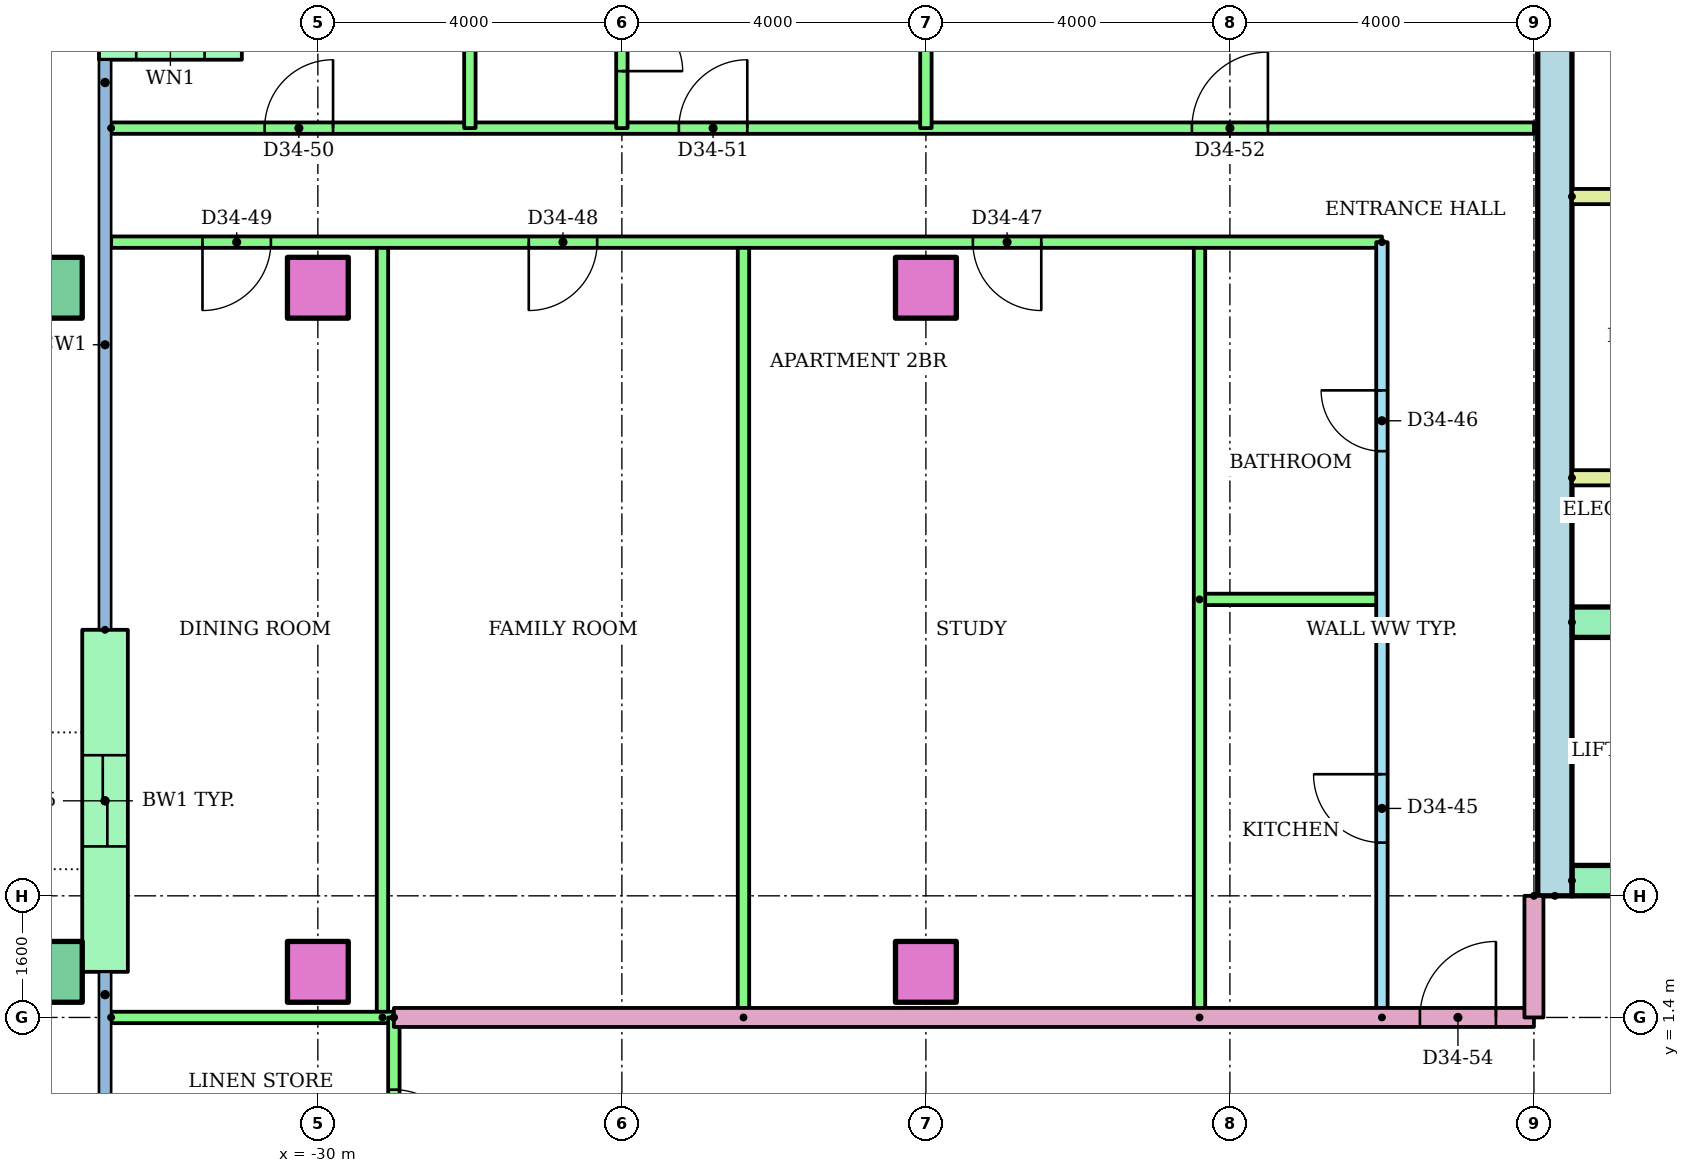
"""IFC4 building model, lengths in metres.
Left out: names, types, materials, properties, quantities, classifications, styles, units other than length and angle.
Written with IfcOpenShell. Run it as: python <this file> out.ifc"""

import sys

from ifc_helpers import new_model, si_unit, direction, frame, frame_2d, origin, origin_2d, place, context, subcontext, project, spatial, rectangle, hollow_rectangle, extrude, element, fill, save


model = new_model("IFC4")
c1 = context("Model", 3, precision=1e-05, world=origin(), true_north=direction((0.0, 1.0)))
c2 = subcontext(c1, "Body", "Model", "MODEL_VIEW")
j1 = project(units=[si_unit("LENGTHUNIT", "METRE"), si_unit("PLANEANGLEUNIT", "RADIAN")], contexts=[c1])
p1 = place(None, origin())
s1 = spatial("IfcSite", under=j1, at=p1, CompositionType="ELEMENT")
p2 = place(p1, origin())
s2 = spatial("IfcBuilding", under=s1, at=p2, CompositionType="ELEMENT")
p3 = place(p2, frame((0.0, 0.0, 132.6)))
s3 = spatial("IfcBuildingStorey", under=s2, at=p3, CompositionType="ELEMENT", Elevation=132.6)
p4 = place(p3, frame((-33.5, 2.0, 0.0)))
e1 = element("IfcColumn", 1, at=p4, inside=s3, PredefinedType="COLUMN", context=c2, shape_type="SweptSolid", body=[
    extrude(hollow_rectangle(XDim=0.8, YDim=0.8, WallThickness=0.04, at=origin_2d()), origin(), (0.0, 0.0, 1.0), 3.2),
])
for number, where in (
    (2, (-30.0, 2.0, 0.0)),
    (3, (-22.0, 2.0, 0.0)),
):
    element("IfcColumn", number, at=place(p3, frame(where)), inside=s3, PredefinedType="COLUMN", context=c2, shape_type="SweptSolid", body=[
        extrude(rectangle(XDim=0.8, YDim=0.8, at=origin_2d()), origin(), (0.0, 0.0, 1.0), 3.2),
    ])
p5 = place(p3, frame((-33.5, 11.0, 0.0)))
e4 = element("IfcColumn", 4, at=p5, inside=s3, PredefinedType="COLUMN", context=c2, shape_type="SweptSolid", body=[
    extrude(hollow_rectangle(XDim=0.8, YDim=0.8, WallThickness=0.04, at=origin_2d()), origin(), (0.0, 0.0, 1.0), 3.2),
])
for number, where in (
    (5, (-30.0, 11.0, 0.0)),
    (6, (-22.0, 11.0, 0.0)),
):
    element("IfcColumn", number, at=place(p3, frame(where)), inside=s3, PredefinedType="COLUMN", context=c2, shape_type="SweptSolid", body=[
        extrude(rectangle(XDim=0.8, YDim=0.8, at=origin_2d()), origin(), (0.0, 0.0, 1.0), 3.2),
    ])
p6 = place(p3, frame((-31.0, 14.3, 0.0), z_axis=(0.0, 0.0, 1.0), x_axis=(-1.0, 0.0, 0.0)))
e7 = element("IfcWall", 7, at=p6, inside=s3, PredefinedType="STANDARD", context=c2, shape_type="SweptSolid", body=[
    extrude(rectangle(XDim=1.88, YDim=0.6, at=frame_2d((0.94, 0.0))), origin(), (0.0, 0.0, 1.0), 2.92),
])
p7 = place(p6, frame((0.49, 0.0, 0.9)))
e8 = element("IfcOpeningElement", 8, at=p7, cuts=e7, PredefinedType="OPENING", context=c2, shape_type="SweptSolid", body=[
    extrude(rectangle(XDim=0.9, YDim=1.5, at=frame_2d((0.45, 0.75))), frame((0.0, 0.31, 0.0), z_axis=(0.0, -1.0, 0.0), x_axis=(1.0, 0.0, 0.0)), (0.0, 0.0, 1.0), 0.62),
])
p8 = place(p3, frame((-32.8, 6.5, 0.0), z_axis=(0.0, 0.0, 1.0), x_axis=(0.0, -1.0, 0.0)))
e9 = element("IfcWall", 9, at=p8, inside=s3, PredefinedType="STANDARD", context=c2, shape_type="SweptSolid", body=[
    extrude(rectangle(XDim=4.5, YDim=0.6, at=frame_2d((2.25, 0.0))), origin(), (0.0, 0.0, 1.0), 2.92),
])
p9 = place(p8, frame((1.65, 0.0, 0.0)))
e10 = element("IfcOpeningElement", 10, at=p9, cuts=e9, PredefinedType="OPENING", context=c2, shape_type="SweptSolid", body=[
    extrude(rectangle(XDim=1.2, YDim=2.1, at=frame_2d((0.6, 1.05))), frame((0.0, 0.31, 0.0), z_axis=(0.0, -1.0, 0.0), x_axis=(1.0, 0.0, 0.0)), (0.0, 0.0, 1.0), 0.62),
])
p10 = place(p3, frame((-13.725, 3.0, 0.0), z_axis=(0.0, 0.0, 1.0), x_axis=(0.0, 1.0, 0.0)))
e11 = element("IfcWall", 11, at=p10, inside=s3, PredefinedType="SHEAR", context=c2, shape_type="SweptSolid", body=[
    extrude(rectangle(XDim=17.0, YDim=0.45, at=frame_2d((8.5, 0.0))), origin(), (0.0, 0.0, 1.0), 2.92),
])
p11 = place(p3, frame((-13.5, 3.2, 0.0)))
e12 = element("IfcWall", 12, at=p11, inside=s3, PredefinedType="SHEAR", context=c2, shape_type="SweptSolid", body=[
    extrude(rectangle(XDim=27.0, YDim=0.4, at=frame_2d((13.5, 0.0))), origin(), (0.0, 0.0, 1.0), 2.92),
])
p12 = place(p11, frame((6.861, 0.0, 0.0)))
e13 = element("IfcOpeningElement", 13, at=p12, cuts=e12, PredefinedType="OPENING", context=c2, shape_type="SweptSolid", body=[
    extrude(rectangle(XDim=1.1, YDim=2.1, at=frame_2d((0.55, 1.05))), frame((0.0, 0.21, 0.0), z_axis=(0.0, -1.0, 0.0), x_axis=(1.0, 0.0, 0.0)), (0.0, 0.0, 1.0), 0.42),
])
p13 = place(p11, frame((9.906, 0.0, 0.0)))
e14 = element("IfcOpeningElement", 14, at=p13, cuts=e12, PredefinedType="OPENING", context=c2, shape_type="SweptSolid", body=[
    extrude(rectangle(XDim=1.1, YDim=2.1, at=frame_2d((0.55, 1.05))), frame((0.0, 0.21, 0.0), z_axis=(0.0, -1.0, 0.0), x_axis=(1.0, 0.0, 0.0)), (0.0, 0.0, 1.0), 0.42),
])
p14 = place(p11, frame((15.994, 0.0, 0.0)))
e15 = element("IfcOpeningElement", 15, at=p14, cuts=e12, PredefinedType="OPENING", context=c2, shape_type="SweptSolid", body=[
    extrude(rectangle(XDim=1.1, YDim=2.1, at=frame_2d((0.55, 1.05))), frame((0.0, 0.21, 0.0), z_axis=(0.0, -1.0, 0.0), x_axis=(1.0, 0.0, 0.0)), (0.0, 0.0, 1.0), 0.42),
])
p15 = place(p11, frame((19.039, 0.0, 0.0)))
e16 = element("IfcOpeningElement", 16, at=p15, cuts=e12, PredefinedType="OPENING", context=c2, shape_type="SweptSolid", body=[
    extrude(rectangle(XDim=1.1, YDim=2.1, at=frame_2d((0.55, 1.05))), frame((0.0, 0.21, 0.0), z_axis=(0.0, -1.0, 0.0), x_axis=(1.0, 0.0, 0.0)), (0.0, 0.0, 1.0), 0.42),
])
p16 = place(p11, frame((12.6, 0.0, 0.0)))
e17 = element("IfcOpeningElement", 17, at=p16, cuts=e12, PredefinedType="OPENING", context=c2, shape_type="SweptSolid", body=[
    extrude(rectangle(XDim=1.8, YDim=2.1, at=frame_2d((0.9, 1.05))), frame((0.0, 0.21, 0.0), z_axis=(0.0, -1.0, 0.0), x_axis=(1.0, 0.0, 0.0)), (0.0, 0.0, 1.0), 0.42),
])
p17 = place(p3, frame((-13.5, 6.6, 0.0)))
e18 = element("IfcWall", 18, at=p17, inside=s3, PredefinedType="SHEAR", context=c2, shape_type="SweptSolid", body=[
    extrude(rectangle(XDim=11.978, YDim=0.4, at=frame_2d((5.989, 0.0))), origin(), (0.0, 0.0, 1.0), 2.92),
])
for number, where in (
    (19, (-13.5, 8.5, 0.0)),
    (20, (-13.5, 12.2, 0.0)),
):
    element("IfcWall", number, at=place(p3, frame(where)), inside=s3, PredefinedType="PARTITIONING", context=c2, shape_type="SweptSolid", body=[
        extrude(rectangle(XDim=3.9, YDim=0.2, at=frame_2d((1.95, 0.0))), origin(), (0.0, 0.0, 1.0), 2.92),
    ])
p18 = place(p3, frame((-16.0, 1.4, 0.0), z_axis=(0.0, 0.0, 1.0), x_axis=(0.0, 1.0, 0.0)))
e21 = element("IfcWall", 21, at=p18, inside=s3, PredefinedType="PARTITIONING", context=c2, shape_type="SweptSolid", body=[
    extrude(rectangle(XDim=10.2, YDim=0.15, at=frame_2d((5.1, 0.0))), origin(), (0.0, 0.0, 1.0), 2.4),
])
p19 = place(p18, frame((2.3, 0.0, 0.0)))
e22 = element("IfcOpeningElement", 22, at=p19, cuts=e21, PredefinedType="OPENING", context=c2, shape_type="SweptSolid", body=[
    extrude(rectangle(XDim=0.9, YDim=2.1, at=frame_2d((0.45, 1.05))), frame((0.0, 0.085, 0.0), z_axis=(0.0, -1.0, 0.0), x_axis=(1.0, 0.0, 0.0)), (0.0, 0.0, 1.0), 0.17),
])
p20 = place(p18, frame((7.45, 0.0, 0.0)))
e23 = element("IfcOpeningElement", 23, at=p20, cuts=e21, PredefinedType="OPENING", context=c2, shape_type="SweptSolid", body=[
    extrude(rectangle(XDim=0.8, YDim=2.1, at=frame_2d((0.4, 1.05))), frame((0.0, 0.085, 0.0), z_axis=(0.0, -1.0, 0.0), x_axis=(1.0, 0.0, 0.0)), (0.0, 0.0, 1.0), 0.17),
])
p21 = place(p3, frame((-18.4, 6.9, 0.0)))
e24 = element("IfcWall", 24, at=p21, inside=s3, PredefinedType="PARTITIONING", context=c2, shape_type="SweptSolid", body=[
    extrude(rectangle(XDim=2.4, YDim=0.15, at=frame_2d((1.2, 0.0))), origin(), (0.0, 0.0, 1.0), 2.4),
])
for number, where, z_axis, x_axis in (
    (25, (-18.4, 1.4, 0.0), (0.0, 0.0, 1.0), (0.0, 1.0, 0.0)),
    (26, (-24.4, 1.4, 0.0), (0.0, 0.0, 1.0), (0.0, 1.0, 0.0)),
    (27, (-29.15, 1.4, 0.0), (0.0, 0.0, 1.0), (0.0, 1.0, 0.0)),
):
    element("IfcWall", number, at=place(p3, frame(where, z_axis=z_axis, x_axis=x_axis)), inside=s3, PredefinedType="PARTITIONING", context=c2, shape_type="SweptSolid", body=[
        extrude(rectangle(XDim=10.2, YDim=0.15, at=frame_2d((5.1, 0.0))), origin(), (0.0, 0.0, 1.0), 2.4),
    ])
p22 = place(p3, frame((-16.0, 11.6, 0.0), z_axis=(0.0, 0.0, 1.0), x_axis=(-1.0, 0.0, 0.0)))
e28 = element("IfcWall", 28, at=p22, inside=s3, PredefinedType="PARTITIONING", context=c2, shape_type="SweptSolid", body=[
    extrude(rectangle(XDim=16.72, YDim=0.15, at=frame_2d((8.36, 0.0))), origin(), (0.0, 0.0, 1.0), 2.4),
])
p23 = place(p22, frame((4.482, 0.0, 0.0)))
e29 = element("IfcOpeningElement", 29, at=p23, cuts=e28, PredefinedType="OPENING", context=c2, shape_type="SweptSolid", body=[
    extrude(rectangle(XDim=0.9, YDim=2.1, at=frame_2d((0.45, 1.05))), frame((0.0, 0.085, 0.0), z_axis=(0.0, -1.0, 0.0), x_axis=(1.0, 0.0, 0.0)), (0.0, 0.0, 1.0), 0.17),
])
p24 = place(p22, frame((10.325, 0.0, 0.0)))
e30 = element("IfcOpeningElement", 30, at=p24, cuts=e28, PredefinedType="OPENING", context=c2, shape_type="SweptSolid", body=[
    extrude(rectangle(XDim=0.9, YDim=2.1, at=frame_2d((0.45, 1.05))), frame((0.0, 0.085, 0.0), z_axis=(0.0, -1.0, 0.0), x_axis=(1.0, 0.0, 0.0)), (0.0, 0.0, 1.0), 0.17),
])
p25 = place(p22, frame((14.618, 0.0, 0.0)))
e31 = element("IfcOpeningElement", 31, at=p25, cuts=e28, PredefinedType="OPENING", context=c2, shape_type="SweptSolid", body=[
    extrude(rectangle(XDim=0.9, YDim=2.1, at=frame_2d((0.45, 1.05))), frame((0.0, 0.085, 0.0), z_axis=(0.0, -1.0, 0.0), x_axis=(1.0, 0.0, 0.0)), (0.0, 0.0, 1.0), 0.17),
])
p26 = place(p3, frame((-32.72, 13.1, 0.0)))
e32 = element("IfcWall", 32, at=p26, inside=s3, PredefinedType="PARTITIONING", context=c2, shape_type="SweptSolid", body=[
    extrude(rectangle(XDim=18.72, YDim=0.15, at=frame_2d((9.36, 0.0))), origin(), (0.0, 0.0, 1.0), 2.4),
])
p27 = place(p26, frame((2.02, 0.0, 0.0)))
e33 = element("IfcOpeningElement", 33, at=p27, cuts=e32, PredefinedType="OPENING", context=c2, shape_type="SweptSolid", body=[
    extrude(rectangle(XDim=0.9, YDim=2.1, at=frame_2d((0.45, 1.05))), frame((0.0, 0.085, 0.0), z_axis=(0.0, -1.0, 0.0), x_axis=(1.0, 0.0, 0.0)), (0.0, 0.0, 1.0), 0.17),
])
p28 = place(p26, frame((7.47, 0.0, 0.0)))
e34 = element("IfcOpeningElement", 34, at=p28, cuts=e32, PredefinedType="OPENING", context=c2, shape_type="SweptSolid", body=[
    extrude(rectangle(XDim=0.9, YDim=2.1, at=frame_2d((0.45, 1.05))), frame((0.0, 0.085, 0.0), z_axis=(0.0, -1.0, 0.0), x_axis=(1.0, 0.0, 0.0)), (0.0, 0.0, 1.0), 0.17),
])
p29 = place(p26, frame((14.22, 0.0, 0.0)))
e35 = element("IfcOpeningElement", 35, at=p29, cuts=e32, PredefinedType="OPENING", context=c2, shape_type="SweptSolid", body=[
    extrude(rectangle(XDim=1.0, YDim=2.1, at=frame_2d((0.5, 1.05))), frame((0.0, 0.085, 0.0), z_axis=(0.0, -1.0, 0.0), x_axis=(1.0, 0.0, 0.0)), (0.0, 0.0, 1.0), 0.17),
])
p30 = place(p3, frame((-28.0, 16.92, 0.0), z_axis=(0.0, 0.0, 1.0), x_axis=(0.0, -1.0, 0.0)))
e36 = element("IfcWall", 36, at=p30, inside=s3, PredefinedType="PARTITIONING", context=c2, shape_type="SweptSolid", body=[
    extrude(rectangle(XDim=3.82, YDim=0.15, at=frame_2d((1.91, 0.0))), origin(), (0.0, 0.0, 1.0), 2.4),
])
p31 = place(p3, frame((-22.0, 18.721, 0.0), z_axis=(0.0, 0.0, 1.0), x_axis=(0.0, -1.0, 0.0)))
e37 = element("IfcWall", 37, at=p31, inside=s3, PredefinedType="PARTITIONING", context=c2, shape_type="SweptSolid", body=[
    extrude(rectangle(XDim=5.621, YDim=0.15, at=frame_2d((2.811, 0.0))), origin(), (0.0, 0.0, 1.0), 2.4),
])
p32 = place(p3, frame((-26.0, 15.4, 0.0), z_axis=(0.0, 0.0, 1.0), x_axis=(0.0, -1.0, 0.0)))
e38 = element("IfcWall", 38, at=p32, inside=s3, PredefinedType="PARTITIONING", context=c2, shape_type="SweptSolid", body=[
    extrude(rectangle(XDim=2.3, YDim=0.15, at=frame_2d((1.15, 0.0))), origin(), (0.0, 0.0, 1.0), 2.4),
])
p33 = place(p32, frame((0.75, 0.0, 0.0)))
e39 = element("IfcOpeningElement", 39, at=p33, cuts=e38, PredefinedType="OPENING", context=c2, shape_type="SweptSolid", body=[
    extrude(rectangle(XDim=0.8, YDim=2.1, at=frame_2d((0.4, 1.05))), frame((0.0, 0.085, 0.0), z_axis=(0.0, -1.0, 0.0), x_axis=(1.0, 0.0, 0.0)), (0.0, 0.0, 1.0), 0.17),
])
p34 = place(p3, frame((-29.0, 1.4, 0.0)))
e40 = element("IfcWall", 40, at=p34, inside=s3, PredefinedType="PARTITIONING", context=c2, shape_type="SweptSolid", body=[
    extrude(rectangle(XDim=15.0, YDim=0.25, at=frame_2d((7.5, 0.0))), origin(), (0.0, 0.0, 1.0), 2.4),
])
p35 = place(p34, frame((13.5, 0.0, 0.0)))
e41 = element("IfcOpeningElement", 41, at=p35, cuts=e40, PredefinedType="OPENING", context=c2, shape_type="SweptSolid", body=[
    extrude(rectangle(XDim=1.0, YDim=2.1, at=frame_2d((0.5, 1.05))), frame((0.0, 0.135, 0.0), z_axis=(0.0, -1.0, 0.0), x_axis=(1.0, 0.0, 0.0)), (0.0, 0.0, 1.0), 0.27),
])
p36 = place(p3, frame((-32.72, 1.4, 0.0)))
e42 = element("IfcWall", 42, at=p36, inside=s3, PredefinedType="PARTITIONING", context=c2, shape_type="SweptSolid", body=[
    extrude(rectangle(XDim=3.72, YDim=0.15, at=frame_2d((1.86, 0.0))), origin(), (0.0, 0.0, 1.0), 2.4),
])
p37 = place(p3, frame((-29.0, 1.4, 0.0), z_axis=(0.0, 0.0, 1.0), x_axis=(0.0, -1.0, 0.0)))
e43 = element("IfcWall", 43, at=p37, inside=s3, PredefinedType="PARTITIONING", context=c2, shape_type="SweptSolid", body=[
    extrude(rectangle(XDim=2.8, YDim=0.15, at=frame_2d((1.4, 0.0))), origin(), (0.0, 0.0, 1.0), 2.4),
])
p38 = place(p37, frame((0.95, 0.0, 0.0)))
e44 = element("IfcOpeningElement", 44, at=p38, cuts=e43, PredefinedType="OPENING", context=c2, shape_type="SweptSolid", body=[
    extrude(rectangle(XDim=0.9, YDim=2.1, at=frame_2d((0.45, 1.05))), frame((0.0, 0.085, 0.0), z_axis=(0.0, -1.0, 0.0), x_axis=(1.0, 0.0, 0.0)), (0.0, 0.0, 1.0), 0.17),
])
p39 = place(p3, frame((-14.0, 3.0, 0.0), z_axis=(0.0, 0.0, 1.0), x_axis=(0.0, -1.0, 0.0)))
e45 = element("IfcWall", 45, at=p39, inside=s3, PredefinedType="PARTITIONING", context=c2, shape_type="SweptSolid", body=[
    extrude(rectangle(XDim=1.6, YDim=0.25, at=frame_2d((0.8, 0.0))), origin(), (0.0, 0.0, 1.0), 2.4),
])
p40 = place(p19, origin())
e46 = element("IfcDoor", 46, at=p40, inside=s3, OperationType="SINGLE_SWING_RIGHT", PredefinedType="DOOR", context=c2, shape_type="SweptSolid", body=[
    extrude(rectangle(XDim=0.9, YDim=2.1, at=frame_2d((0.45, 1.05))), frame((0.0, 0.025, 0.0), z_axis=(0.0, -1.0, 0.0), x_axis=(1.0, 0.0, 0.0)), (0.0, 0.0, 1.0), 0.05),
])
fill(e22, e46)
p41 = place(p20, origin())
e47 = element("IfcDoor", 47, at=p41, inside=s3, OperationType="SINGLE_SWING_RIGHT", PredefinedType="DOOR", context=c2, shape_type="SweptSolid", body=[
    extrude(rectangle(XDim=0.8, YDim=2.1, at=frame_2d((0.4, 1.05))), frame((0.0, 0.025, 0.0), z_axis=(0.0, -1.0, 0.0), x_axis=(1.0, 0.0, 0.0)), (0.0, 0.0, 1.0), 0.05),
])
fill(e23, e47)
p42 = place(p23, origin())
e48 = element("IfcDoor", 48, at=p42, inside=s3, OperationType="SINGLE_SWING_LEFT", PredefinedType="DOOR", context=c2, shape_type="SweptSolid", body=[
    extrude(rectangle(XDim=0.9, YDim=2.1, at=frame_2d((0.45, 1.05))), frame((0.0, 0.025, 0.0), z_axis=(0.0, -1.0, 0.0), x_axis=(1.0, 0.0, 0.0)), (0.0, 0.0, 1.0), 0.05),
])
fill(e29, e48)
p43 = place(p24, origin())
e49 = element("IfcDoor", 49, at=p43, inside=s3, OperationType="SINGLE_SWING_RIGHT", PredefinedType="DOOR", context=c2, shape_type="SweptSolid", body=[
    extrude(rectangle(XDim=0.9, YDim=2.1, at=frame_2d((0.45, 1.05))), frame((0.0, 0.025, 0.0), z_axis=(0.0, -1.0, 0.0), x_axis=(1.0, 0.0, 0.0)), (0.0, 0.0, 1.0), 0.05),
])
fill(e30, e49)
p44 = place(p25, origin())
e50 = element("IfcDoor", 50, at=p44, inside=s3, OperationType="SINGLE_SWING_RIGHT", PredefinedType="DOOR", context=c2, shape_type="SweptSolid", body=[
    extrude(rectangle(XDim=0.9, YDim=2.1, at=frame_2d((0.45, 1.05))), frame((0.0, 0.025, 0.0), z_axis=(0.0, -1.0, 0.0), x_axis=(1.0, 0.0, 0.0)), (0.0, 0.0, 1.0), 0.05),
])
fill(e31, e50)
p45 = place(p27, origin())
e51 = element("IfcDoor", 51, at=p45, inside=s3, OperationType="SINGLE_SWING_RIGHT", PredefinedType="DOOR", context=c2, shape_type="SweptSolid", body=[
    extrude(rectangle(XDim=0.9, YDim=2.1, at=frame_2d((0.45, 1.05))), frame((0.0, 0.025, 0.0), z_axis=(0.0, -1.0, 0.0), x_axis=(1.0, 0.0, 0.0)), (0.0, 0.0, 1.0), 0.05),
])
fill(e33, e51)
p46 = place(p28, origin())
e52 = element("IfcDoor", 52, at=p46, inside=s3, OperationType="SINGLE_SWING_RIGHT", PredefinedType="DOOR", context=c2, shape_type="SweptSolid", body=[
    extrude(rectangle(XDim=0.9, YDim=2.1, at=frame_2d((0.45, 1.05))), frame((0.0, 0.025, 0.0), z_axis=(0.0, -1.0, 0.0), x_axis=(1.0, 0.0, 0.0)), (0.0, 0.0, 1.0), 0.05),
])
fill(e34, e52)
p47 = place(p29, origin())
e53 = element("IfcDoor", 53, at=p47, inside=s3, OperationType="SINGLE_SWING_RIGHT", PredefinedType="DOOR", context=c2, shape_type="SweptSolid", body=[
    extrude(rectangle(XDim=1.0, YDim=2.1, at=frame_2d((0.5, 1.05))), frame((0.0, 0.025, 0.0), z_axis=(0.0, -1.0, 0.0), x_axis=(1.0, 0.0, 0.0)), (0.0, 0.0, 1.0), 0.05),
])
fill(e35, e53)
p48 = place(p33, origin())
e54 = element("IfcDoor", 54, at=p48, inside=s3, OperationType="SINGLE_SWING_RIGHT", PredefinedType="DOOR", context=c2, shape_type="SweptSolid", body=[
    extrude(rectangle(XDim=0.8, YDim=2.1, at=frame_2d((0.4, 1.05))), frame((0.0, 0.025, 0.0), z_axis=(0.0, -1.0, 0.0), x_axis=(1.0, 0.0, 0.0)), (0.0, 0.0, 1.0), 0.05),
])
fill(e39, e54)
p49 = place(p35, origin())
e55 = element("IfcDoor", 55, at=p49, inside=s3, OperationType="SINGLE_SWING_RIGHT", PredefinedType="DOOR", context=c2, shape_type="SweptSolid", body=[
    extrude(rectangle(XDim=1.0, YDim=2.1, at=frame_2d((0.5, 1.05))), frame((0.0, 0.025, 0.0), z_axis=(0.0, -1.0, 0.0), x_axis=(1.0, 0.0, 0.0)), (0.0, 0.0, 1.0), 0.05),
])
fill(e41, e55)
p50 = place(p38, origin())
e56 = element("IfcDoor", 56, at=p50, inside=s3, OperationType="SINGLE_SWING_RIGHT", PredefinedType="DOOR", context=c2, shape_type="SweptSolid", body=[
    extrude(rectangle(XDim=0.9, YDim=2.1, at=frame_2d((0.45, 1.05))), frame((0.0, 0.025, 0.0), z_axis=(0.0, -1.0, 0.0), x_axis=(1.0, 0.0, 0.0)), (0.0, 0.0, 1.0), 0.05),
])
fill(e44, e56)
p51 = place(p9, origin())
e57 = element("IfcDoor", 57, at=p51, inside=s3, OperationType="SLIDING_TO_LEFT", PredefinedType="DOOR", context=c2, shape_type="SweptSolid", body=[
    extrude(rectangle(XDim=1.2, YDim=2.1, at=frame_2d((0.6, 1.05))), frame((0.0, 0.025, 0.0), z_axis=(0.0, -1.0, 0.0), x_axis=(1.0, 0.0, 0.0)), (0.0, 0.0, 1.0), 0.05),
])
fill(e10, e57)
save(model, sys.argv[1])
